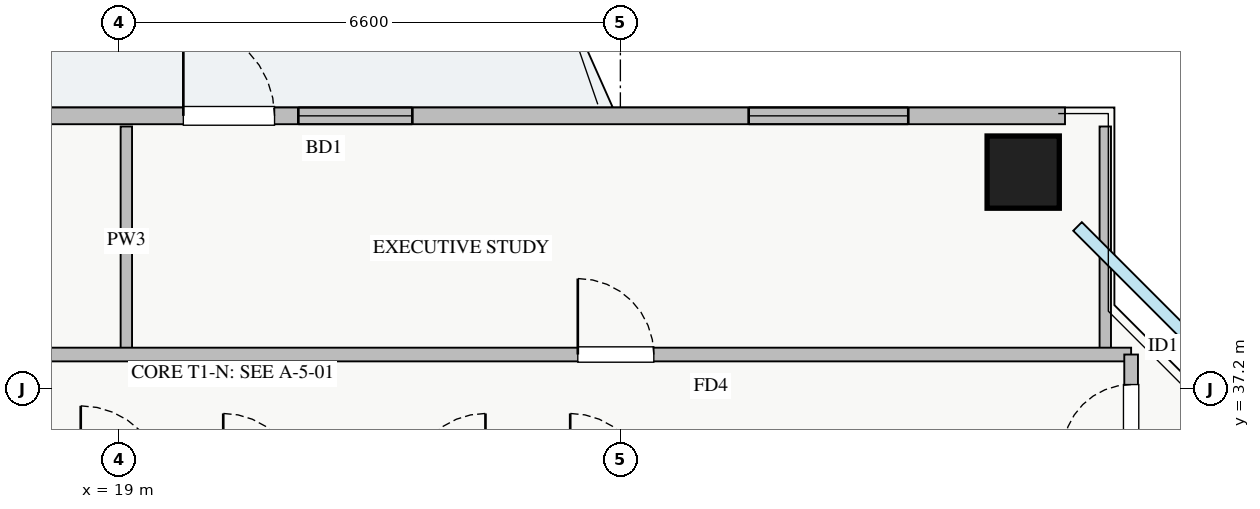
"""IFC4 building model, lengths in metres.
Left out: names, types, materials, properties, quantities, classifications, styles, units other than length and angle.
Written with IfcOpenShell. Run it as: python <this file> out.ifc"""

import sys

from ifc_helpers import new_model, si_unit, direction, frame, frame_2d, origin, origin_2d, place, context, subcontext, project, spatial, rectangle, extrude, source, transform, mapped, element, fill, save


model = new_model("IFC4")
c1 = context("Model", 3, precision=1e-05, world=origin(), true_north=direction((0.0, 1.0)))
c2 = subcontext(c1, "Body", "Model", "MODEL_VIEW")
j1 = project(units=[si_unit("LENGTHUNIT", "METRE"), si_unit("PLANEANGLEUNIT", "RADIAN")], contexts=[c1])
p1 = place(None, origin())
s1 = spatial("IfcSite", under=j1, at=p1, CompositionType="ELEMENT")
p2 = place(p1, origin())
s2 = spatial("IfcBuilding", under=s1, at=p2, CompositionType="ELEMENT")
p3 = place(p2, frame((0.0, 0.0, 176.25)))
s3 = spatial("IfcBuildingStorey", under=s2, at=p3, CompositionType="ELEMENT", Elevation=176.25)
m1 = source(origin(), c2, "Body", "SweptSolid", [
    extrude(rectangle(XDim=0.95, YDim=0.95, at=origin_2d()), origin(), (0.0, 0.0, 1.0), 3.25),
])
p4 = place(p3, frame((30.9, 40.05, 0.0), z_axis=(0.0, 0.0, 1.0), x_axis=(1.0, 0.0, 0.0)))
e1 = element("IfcColumn", 1, at=p4, inside=s3, PredefinedType="COLUMN", context=c2, shape_type="MappedRepresentation", body=[
    mapped(m1, transform((0.0, 0.0, 0.0), x_axis=(1.0, 0.0, 0.0), y_axis=(0.0, 1.0, 0.0), z_axis=(0.0, 0.0, 1.0), scale=1.0)),
])
p5 = place(p3, frame((6.55, 40.79, 0.0), z_axis=(0.0, 0.0, 1.0), x_axis=(1.0, 0.0, 0.0)))
e2 = element("IfcWall", 2, at=p5, inside=s3, PredefinedType="STANDARD", context=c2, shape_type="SweptSolid", body=[
    extrude(rectangle(XDim=24.9, YDim=0.22, at=frame_2d((12.45, 0.0))), origin(), (0.0, 0.0, 1.0), 2.61),
])
p6 = place(p5, frame((13.3, 0.0, 0.0)))
e3 = element("IfcOpeningElement", 3, at=p6, cuts=e2, PredefinedType="OPENING", context=c2, shape_type="SweptSolid", body=[
    extrude(rectangle(XDim=1.2, YDim=2.1, at=frame_2d((0.6, 1.05))), frame((0.0, 0.12, 0.0), z_axis=(0.0, -1.0, 0.0), x_axis=(1.0, 0.0, 0.0)), (0.0, 0.0, 1.0), 0.24),
])
p7 = place(p5, frame((0.373, 0.0, 0.9)))
e4 = element("IfcOpeningElement", 4, at=p7, cuts=e2, PredefinedType="OPENING", context=c2, shape_type="SweptSolid", body=[
    extrude(rectangle(XDim=1.5, YDim=1.5, at=frame_2d((0.75, 0.75))), frame((0.0, 0.12, 0.0), z_axis=(0.0, -1.0, 0.0), x_axis=(1.0, 0.0, 0.0)), (0.0, 0.0, 1.0), 0.24),
])
p8 = place(p5, frame((8.438, 0.0, 0.9)))
e5 = element("IfcOpeningElement", 5, at=p8, cuts=e2, PredefinedType="OPENING", context=c2, shape_type="SweptSolid", body=[
    extrude(rectangle(XDim=1.8, YDim=1.45, at=frame_2d((0.9, 0.725))), frame((0.0, 0.12, 0.0), z_axis=(0.0, -1.0, 0.0), x_axis=(1.0, 0.0, 0.0)), (0.0, 0.0, 1.0), 0.24),
])
p9 = place(p5, frame((14.813, 0.0, 0.9)))
e6 = element("IfcOpeningElement", 6, at=p9, cuts=e2, PredefinedType="OPENING", context=c2, shape_type="SweptSolid", body=[
    extrude(rectangle(XDim=1.5, YDim=1.45, at=frame_2d((0.75, 0.725))), frame((0.0, 0.12, 0.0), z_axis=(0.0, -1.0, 0.0), x_axis=(1.0, 0.0, 0.0)), (0.0, 0.0, 1.0), 0.24),
])
p10 = place(p5, frame((20.738, 0.0, 0.9)))
e7 = element("IfcOpeningElement", 7, at=p10, cuts=e2, PredefinedType="OPENING", context=c2, shape_type="SweptSolid", body=[
    extrude(rectangle(XDim=2.1, YDim=1.48, at=frame_2d((1.05, 0.74))), frame((0.0, 0.12, 0.0), z_axis=(0.0, -1.0, 0.0), x_axis=(1.0, 0.0, 0.0)), (0.0, 0.0, 1.0), 0.24),
])
p11 = place(p5, frame((4.152, 0.0, 0.9)))
e8 = element("IfcOpeningElement", 8, at=p11, cuts=e2, PredefinedType="OPENING", context=c2, shape_type="SweptSolid", body=[
    extrude(rectangle(XDim=2.4, YDim=1.5, at=frame_2d((1.2, 0.75))), frame((0.0, 0.12, 0.0), z_axis=(0.0, -1.0, 0.0), x_axis=(1.0, 0.0, 0.0)), (0.0, 0.0, 1.0), 0.24),
])
p12 = place(p3, frame((19.1, 37.65, 0.0), z_axis=(0.0, 0.0, 1.0), x_axis=(0.0, 1.0, 0.0)))
e9 = element("IfcWall", 9, at=p12, inside=s3, PredefinedType="PARTITIONING", context=c2, shape_type="SweptSolid", body=[
    extrude(rectangle(XDim=3.0, YDim=0.15, at=frame_2d((1.5, 0.0))), origin(), (0.0, 0.0, 1.0), 2.815),
])
p13 = place(p3, frame((31.98, 37.65, 0.0), z_axis=(0.0, 0.0, 1.0), x_axis=(0.0, 1.0, 0.0)))
e10 = element("IfcWall", 10, at=p13, inside=s3, PredefinedType="PARTITIONING", context=c2, shape_type="SweptSolid", body=[
    extrude(rectangle(XDim=3.0, YDim=0.15, at=frame_2d((1.5, 0.0))), origin(), (0.0, 0.0, 1.0), 3.07),
])
p14 = place(p3, frame((8.78, 37.65, 0.0), z_axis=(0.0, 0.0, 1.0), x_axis=(1.0, 0.0, 0.0)))
e11 = element("IfcWall", 11, at=p14, inside=s3, PredefinedType="PARTITIONING", context=c2, shape_type="SweptSolid", body=[
    extrude(rectangle(XDim=23.54, YDim=0.18, at=frame_2d((11.77, 0.0))), origin(), (0.0, 0.0, 1.0), 3.07),
])
p15 = place(p14, frame((4.66, 0.0, 0.0)))
e12 = element("IfcOpeningElement", 12, at=p15, cuts=e11, PredefinedType="OPENING", context=c2, shape_type="SweptSolid", body=[
    extrude(rectangle(XDim=1.0, YDim=2.05, at=frame_2d((0.5, 1.025))), frame((0.0, 0.1, 0.0), z_axis=(0.0, -1.0, 0.0), x_axis=(1.0, 0.0, 0.0)), (0.0, 0.0, 1.0), 0.2),
])
p16 = place(p14, frame((16.26, 0.0, 0.0)))
e13 = element("IfcOpeningElement", 13, at=p16, cuts=e11, PredefinedType="OPENING", context=c2, shape_type="SweptSolid", body=[
    extrude(rectangle(XDim=1.0, YDim=2.05, at=frame_2d((0.5, 1.025))), frame((0.0, 0.1, 0.0), z_axis=(0.0, -1.0, 0.0), x_axis=(1.0, 0.0, 0.0)), (0.0, 0.0, 1.0), 0.2),
])
p17 = place(p3, frame((32.32, 8.31, 0.0), z_axis=(0.0, 0.0, 1.0), x_axis=(0.0, 1.0, 0.0)))
e14 = element("IfcWall", 14, at=p17, inside=s3, PredefinedType="PARTITIONING", context=c2, shape_type="SweptSolid", body=[
    extrude(rectangle(XDim=29.34, YDim=0.18, at=frame_2d((14.67, 0.0))), origin(), (0.0, 0.0, 1.0), 3.07),
])
p18 = place(p17, frame((28.045, 0.0, 0.0)))
e15 = element("IfcOpeningElement", 15, at=p18, cuts=e14, PredefinedType="OPENING", context=c2, shape_type="SweptSolid", body=[
    extrude(rectangle(XDim=0.9, YDim=2.05, at=frame_2d((0.45, 1.025))), frame((0.0, 0.1, 0.0), z_axis=(0.0, -1.0, 0.0), x_axis=(1.0, 0.0, 0.0)), (0.0, 0.0, 1.0), 0.2),
])
p19 = place(p17, frame((0.415, 0.0, 0.0)))
e16 = element("IfcOpeningElement", 16, at=p19, cuts=e14, PredefinedType="OPENING", context=c2, shape_type="SweptSolid", body=[
    extrude(rectangle(XDim=0.9, YDim=2.05, at=frame_2d((0.45, 1.025))), frame((0.0, 0.1, 0.0), z_axis=(0.0, -1.0, 0.0), x_axis=(1.0, 0.0, 0.0)), (0.0, 0.0, 1.0), 0.2),
])
p20 = place(p17, frame((5.325, 0.0, 0.0)))
e17 = element("IfcOpeningElement", 17, at=p20, cuts=e14, PredefinedType="OPENING", context=c2, shape_type="SweptSolid", body=[
    extrude(rectangle(XDim=1.0, YDim=2.05, at=frame_2d((0.5, 1.025))), frame((0.0, 0.1, 0.0), z_axis=(0.0, -1.0, 0.0), x_axis=(1.0, 0.0, 0.0)), (0.0, 0.0, 1.0), 0.2),
])
p21 = place(p17, frame((14.095, 0.0, 0.0)))
e18 = element("IfcOpeningElement", 18, at=p21, cuts=e14, PredefinedType="OPENING", context=c2, shape_type="SweptSolid", body=[
    extrude(rectangle(XDim=1.0, YDim=2.05, at=frame_2d((0.5, 1.025))), frame((0.0, 0.1, 0.0), z_axis=(0.0, -1.0, 0.0), x_axis=(1.0, 0.0, 0.0)), (0.0, 0.0, 1.0), 0.2),
])
p22 = place(p17, frame((22.96, 0.0, 0.0)))
e19 = element("IfcOpeningElement", 19, at=p22, cuts=e14, PredefinedType="OPENING", context=c2, shape_type="SweptSolid", body=[
    extrude(rectangle(XDim=1.0, YDim=2.05, at=frame_2d((0.5, 1.025))), frame((0.0, 0.1, 0.0), z_axis=(0.0, -1.0, 0.0), x_axis=(1.0, 0.0, 0.0)), (0.0, 0.0, 1.0), 0.2),
])
m2 = source(origin(), c2, "Body", "SweptSolid", [
    extrude(rectangle(XDim=1.2, YDim=2.1, at=frame_2d((0.6, 1.05))), frame((0.0, 0.025, 0.0), z_axis=(0.0, -1.0, 0.0), x_axis=(1.0, 0.0, 0.0)), (0.0, 0.0, 1.0), 0.05),
])
p23 = place(p6, origin())
e20 = element("IfcDoor", 20, at=p23, inside=s3, OperationType="SINGLE_SWING_LEFT", PredefinedType="DOOR", context=c2, shape_type="MappedRepresentation", body=[
    mapped(m2, transform((0.0, 0.0, 0.0), x_axis=(1.0, 0.0, 0.0), y_axis=(0.0, 1.0, 0.0), z_axis=(0.0, 0.0, 1.0), scale=1.0)),
])
fill(e3, e20)
m3 = source(origin(), c2, "Body", "SweptSolid", [
    extrude(rectangle(XDim=1.5, YDim=1.45, at=frame_2d((0.75, 0.725))), frame((0.0, 0.03, 0.0), z_axis=(0.0, -1.0, 0.0), x_axis=(1.0, 0.0, 0.0)), (0.0, 0.0, 1.0), 0.06),
])
p24 = place(p9, origin())
e21 = element("IfcWindow", 21, at=p24, inside=s3, PartitioningType="DOUBLE_PANEL_VERTICAL", PredefinedType="WINDOW", context=c2, shape_type="MappedRepresentation", body=[
    mapped(m3, transform((0.0, 0.0, 0.0), x_axis=(1.0, 0.0, 0.0), y_axis=(0.0, 1.0, 0.0), z_axis=(0.0, 0.0, 1.0), scale=1.0)),
])
fill(e6, e21)
m4 = source(origin(), c2, "Body", "SweptSolid", [
    extrude(rectangle(XDim=2.1, YDim=1.48, at=frame_2d((1.05, 0.74))), frame((0.0, 0.03, 0.0), z_axis=(0.0, -1.0, 0.0), x_axis=(1.0, 0.0, 0.0)), (0.0, 0.0, 1.0), 0.06),
])
p25 = place(p10, origin())
e22 = element("IfcWindow", 22, at=p25, inside=s3, PartitioningType="TRIPLE_PANEL_VERTICAL", PredefinedType="WINDOW", context=c2, shape_type="MappedRepresentation", body=[
    mapped(m4, transform((0.0, 0.0, 0.0), x_axis=(1.0, 0.0, 0.0), y_axis=(0.0, 1.0, 0.0), z_axis=(0.0, 0.0, 1.0), scale=1.0)),
])
fill(e7, e22)
m5 = source(origin(), c2, "Body", "SweptSolid", [
    extrude(rectangle(XDim=1.0, YDim=2.05, at=frame_2d((0.5, 1.025))), frame((0.0, 0.025, 0.0), z_axis=(0.0, -1.0, 0.0), x_axis=(1.0, 0.0, 0.0)), (0.0, 0.0, 1.0), 0.05),
])
p26 = place(p16, origin())
e23 = element("IfcDoor", 23, at=p26, inside=s3, OperationType="SINGLE_SWING_LEFT", PredefinedType="DOOR", context=c2, shape_type="MappedRepresentation", body=[
    mapped(m5, transform((0.0, 0.0, 0.0), x_axis=(1.0, 0.0, 0.0), y_axis=(0.0, 1.0, 0.0), z_axis=(0.0, 0.0, 1.0), scale=1.0)),
])
fill(e13, e23)
m6 = source(origin(), c2, "Body", "SweptSolid", [
    extrude(rectangle(XDim=0.9, YDim=2.05, at=frame_2d((0.45, 1.025))), frame((0.0, 0.025, 0.0), z_axis=(0.0, -1.0, 0.0), x_axis=(1.0, 0.0, 0.0)), (0.0, 0.0, 1.0), 0.05),
])
p27 = place(p18, origin())
e24 = element("IfcDoor", 24, at=p27, inside=s3, OperationType="SINGLE_SWING_LEFT", PredefinedType="DOOR", context=c2, shape_type="MappedRepresentation", body=[
    mapped(m6, transform((0.0, 0.0, 0.0), x_axis=(1.0, 0.0, 0.0), y_axis=(0.0, 1.0, 0.0), z_axis=(0.0, 0.0, 1.0), scale=1.0)),
])
fill(e15, e24)
save(model, sys.argv[1])
